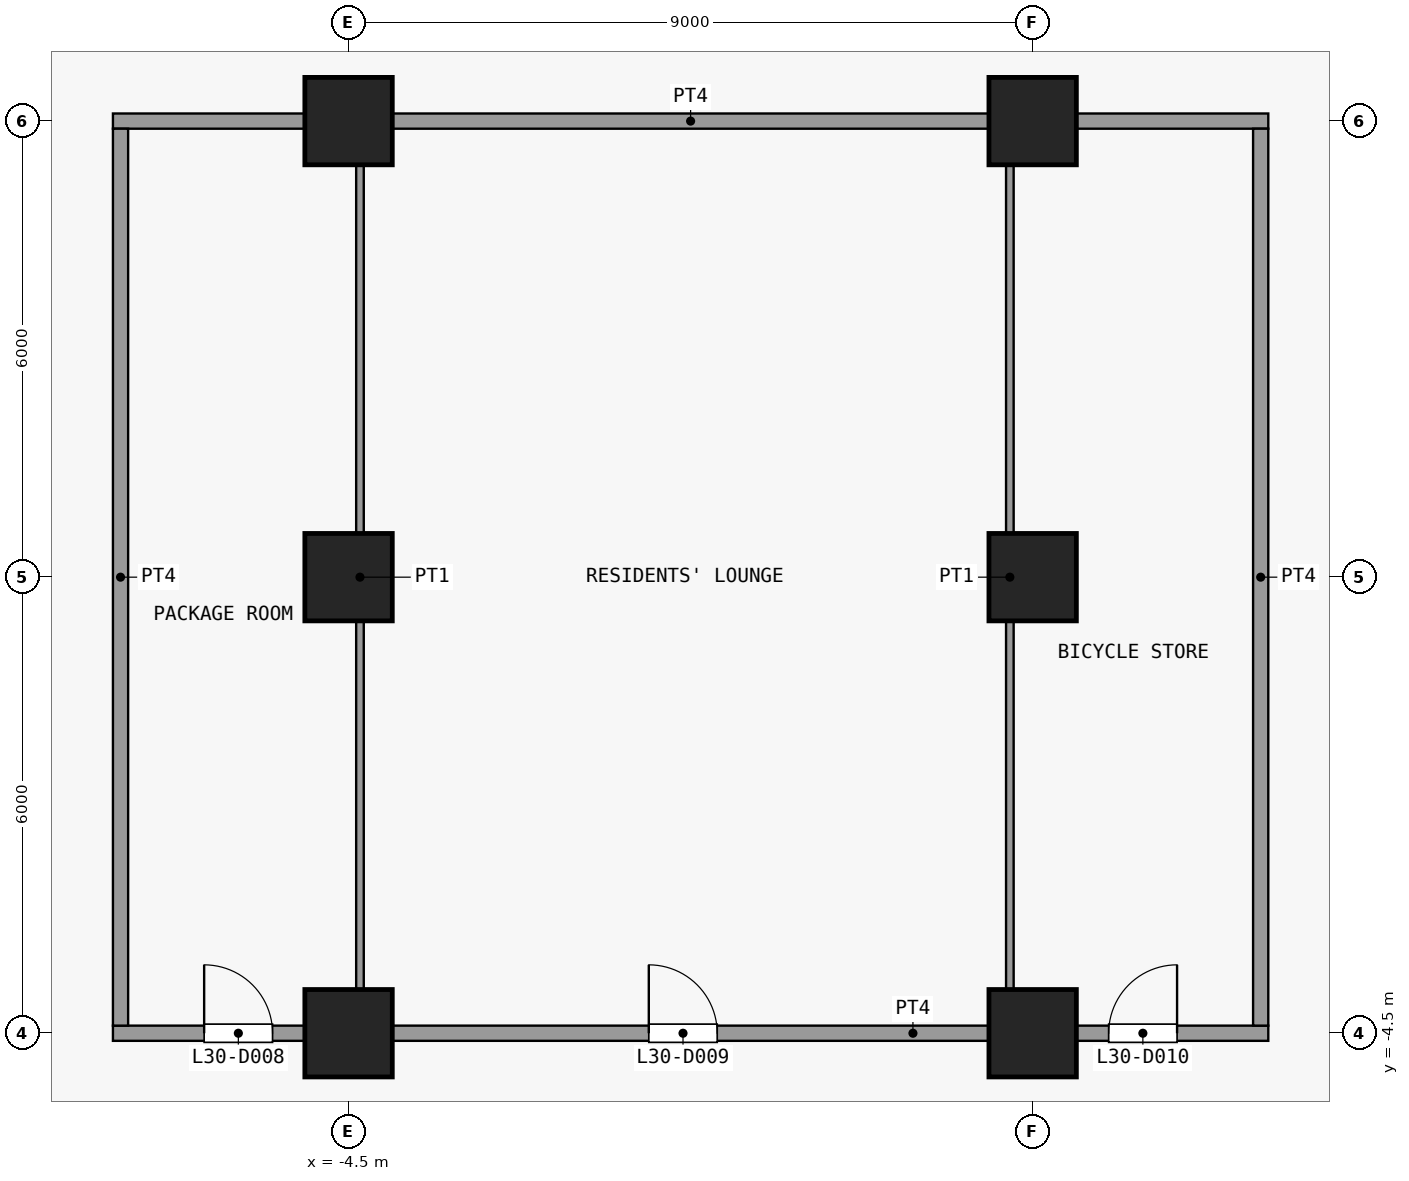
"""IFC4 building model, lengths in metres.
Left out: names, types, materials, properties, quantities, classifications, styles, units other than length and angle.
Written with IfcOpenShell. Run it as: python <this file> out.ifc"""

import sys

from ifc_helpers import new_model, si_unit, direction, frame, frame_2d, origin, origin_2d, place, context, subcontext, project, spatial, rectangle, extrude, element, fill, save


model = new_model("IFC4")
c1 = context("Model", 3, precision=1e-05, world=origin(), true_north=direction((0.0, 1.0)))
c2 = subcontext(c1, "Body", "Model", "MODEL_VIEW")
j1 = project(units=[si_unit("LENGTHUNIT", "METRE"), si_unit("PLANEANGLEUNIT", "RADIAN")], contexts=[c1])
p1 = place(None, origin())
s1 = spatial("IfcSite", under=j1, at=p1, CompositionType="ELEMENT")
p2 = place(p1, origin())
s2 = spatial("IfcBuilding", under=s1, at=p2, CompositionType="ELEMENT")
p3 = place(p2, frame((0.0, 0.0, 120.7)))
s3 = spatial("IfcBuildingStorey", under=s2, at=p3, CompositionType="ELEMENT", Elevation=120.7)
for number, where, z_axis, x_axis in (
    (1, (-4.5, -4.5, 0.0), (0.0, 0.0, 1.0), (1.0, 0.0, 0.0)),
    (2, (-4.5, 1.5, 0.0), (0.0, 0.0, 1.0), (1.0, 0.0, 0.0)),
    (3, (-4.5, 7.5, 0.0), (0.0, 0.0, 1.0), (1.0, 0.0, 0.0)),
    (4, (4.5, -4.5, 0.0), (0.0, 0.0, 1.0), (1.0, 0.0, 0.0)),
    (5, (4.5, 1.5, 0.0), (0.0, 0.0, 1.0), (1.0, 0.0, 0.0)),
    (6, (4.5, 7.5, 0.0), (0.0, 0.0, 1.0), (1.0, 0.0, 0.0)),
):
    element("IfcColumn", number, at=place(p3, frame(where, z_axis=z_axis, x_axis=x_axis)), inside=s3, PredefinedType="COLUMN", context=c2, shape_type="SweptSolid", body=[
        extrude(rectangle(XDim=1.15, YDim=1.15, at=origin_2d()), origin(), (0.0, 0.0, 1.0), 3.6),
    ])
p4 = place(p3, frame((-7.6, -4.5, 0.0), z_axis=(0.0, 0.0, 1.0), x_axis=(1.0, 0.0, 0.0)))
e7 = element("IfcWall", 7, at=p4, inside=s3, PredefinedType="PARTITIONING", context=c2, shape_type="SweptSolid", body=[
    extrude(rectangle(XDim=15.2, YDim=0.2, at=frame_2d((7.6, 0.0))), origin(), (0.0, 0.0, 1.0), 3.3),
])
p5 = place(p4, frame((1.2, 0.0, 0.0)))
e8 = element("IfcOpeningElement", 8, at=p5, cuts=e7, PredefinedType="OPENING", context=c2, shape_type="SweptSolid", body=[
    extrude(rectangle(XDim=0.9, YDim=2.1, at=frame_2d((0.45, 1.05))), frame((0.0, 0.11, 0.0), z_axis=(0.0, -1.0, 0.0), x_axis=(1.0, 0.0, 0.0)), (0.0, 0.0, 1.0), 0.22),
])
p6 = place(p4, frame((7.05, 0.0, 0.0)))
e9 = element("IfcOpeningElement", 9, at=p6, cuts=e7, PredefinedType="OPENING", context=c2, shape_type="SweptSolid", body=[
    extrude(rectangle(XDim=0.9, YDim=2.1, at=frame_2d((0.45, 1.05))), frame((0.0, 0.11, 0.0), z_axis=(0.0, -1.0, 0.0), x_axis=(1.0, 0.0, 0.0)), (0.0, 0.0, 1.0), 0.22),
])
p7 = place(p4, frame((13.1, 0.0, 0.0)))
e10 = element("IfcOpeningElement", 10, at=p7, cuts=e7, PredefinedType="OPENING", context=c2, shape_type="SweptSolid", body=[
    extrude(rectangle(XDim=0.9, YDim=2.1, at=frame_2d((0.45, 1.05))), frame((0.0, 0.11, 0.0), z_axis=(0.0, -1.0, 0.0), x_axis=(1.0, 0.0, 0.0)), (0.0, 0.0, 1.0), 0.22),
])
p8 = place(p3, frame((-7.6, 7.5, 0.0), z_axis=(0.0, 0.0, 1.0), x_axis=(1.0, 0.0, 0.0)))
e11 = element("IfcWall", 11, at=p8, inside=s3, PredefinedType="PARTITIONING", context=c2, shape_type="SweptSolid", body=[
    extrude(rectangle(XDim=15.2, YDim=0.2, at=frame_2d((7.6, 0.0))), origin(), (0.0, 0.0, 1.0), 3.3),
])
p9 = place(p3, frame((-7.5, -4.4, 0.0), z_axis=(0.0, 0.0, 1.0), x_axis=(0.0, 1.0, 0.0)))
e12 = element("IfcWall", 12, at=p9, inside=s3, PredefinedType="PARTITIONING", context=c2, shape_type="SweptSolid", body=[
    extrude(rectangle(XDim=11.8, YDim=0.2, at=frame_2d((5.9, 0.0))), origin(), (0.0, 0.0, 1.0), 3.3),
])
for number, where, z_axis, x_axis in (
    (13, (-4.35, -4.4, 0.0), (0.0, 0.0, 1.0), (0.0, 1.0, 0.0)),
    (14, (4.2, -4.4, 0.0), (0.0, 0.0, 1.0), (0.0, 1.0, 0.0)),
):
    element("IfcWall", number, at=place(p3, frame(where, z_axis=z_axis, x_axis=x_axis)), inside=s3, PredefinedType="PARTITIONING", context=c2, shape_type="SweptSolid", body=[
        extrude(rectangle(XDim=11.8, YDim=0.1, at=frame_2d((5.9, 0.0))), origin(), (0.0, 0.0, 1.0), 3.3),
    ])
p10 = place(p3, frame((7.5, -4.4, 0.0), z_axis=(0.0, 0.0, 1.0), x_axis=(0.0, 1.0, 0.0)))
e15 = element("IfcWall", 15, at=p10, inside=s3, PredefinedType="PARTITIONING", context=c2, shape_type="SweptSolid", body=[
    extrude(rectangle(XDim=11.8, YDim=0.2, at=frame_2d((5.9, 0.0))), origin(), (0.0, 0.0, 1.0), 3.3),
])
p11 = place(p5, origin())
e16 = element("IfcDoor", 16, at=p11, inside=s3, OperationType="SINGLE_SWING_RIGHT", PredefinedType="DOOR", context=c2, shape_type="SweptSolid", body=[
    extrude(rectangle(XDim=0.9, YDim=2.1, at=frame_2d((0.45, 1.05))), frame((0.0, 0.025, 0.0), z_axis=(0.0, -1.0, 0.0), x_axis=(1.0, 0.0, 0.0)), (0.0, 0.0, 1.0), 0.05),
])
fill(e8, e16)
p12 = place(p6, origin())
e17 = element("IfcDoor", 17, at=p12, inside=s3, OperationType="SINGLE_SWING_RIGHT", PredefinedType="DOOR", context=c2, shape_type="SweptSolid", body=[
    extrude(rectangle(XDim=0.9, YDim=2.1, at=frame_2d((0.45, 1.05))), frame((0.0, 0.025, 0.0), z_axis=(0.0, -1.0, 0.0), x_axis=(1.0, 0.0, 0.0)), (0.0, 0.0, 1.0), 0.05),
])
fill(e9, e17)
p13 = place(p7, origin())
e18 = element("IfcDoor", 18, at=p13, inside=s3, OperationType="SINGLE_SWING_LEFT", PredefinedType="DOOR", context=c2, shape_type="SweptSolid", body=[
    extrude(rectangle(XDim=0.9, YDim=2.1, at=frame_2d((0.45, 1.05))), frame((0.0, 0.025, 0.0), z_axis=(0.0, -1.0, 0.0), x_axis=(1.0, 0.0, 0.0)), (0.0, 0.0, 1.0), 0.05),
])
fill(e10, e18)
save(model, sys.argv[1])
